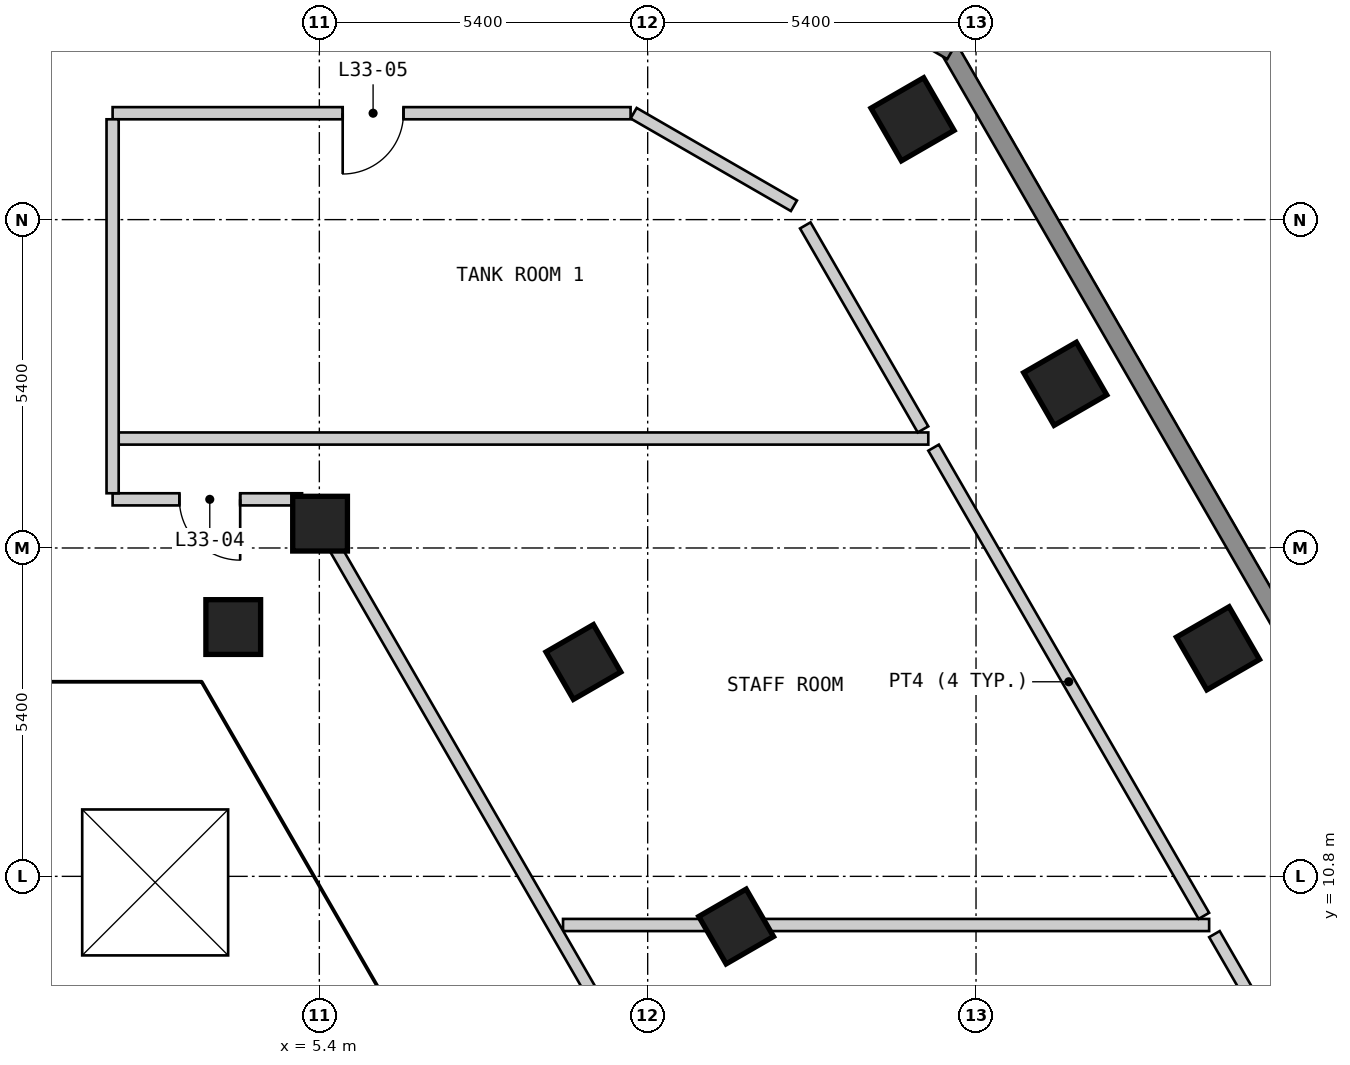
"""IFC4 building model, lengths in metres.
Left out: names, types, materials, properties, quantities, classifications, styles, units other than length and angle.
Written with IfcOpenShell. Run it as: python <this file> out.ifc"""

import sys

from ifc_helpers import new_model, si_unit, direction, frame, frame_2d, origin, origin_2d, place, context, subcontext, project, spatial, polyline, rectangle, outline, extrude, element, fill, save


model = new_model("IFC4")
c1 = context("Model", 3, precision=1e-05, world=origin(), true_north=direction((0.0, 1.0)))
c2 = subcontext(c1, "Body", "Model", "MODEL_VIEW")
j1 = project(units=[si_unit("LENGTHUNIT", "METRE"), si_unit("PLANEANGLEUNIT", "RADIAN")], contexts=[c1])
p1 = place(None, origin())
s1 = spatial("IfcSite", under=j1, at=p1, CompositionType="ELEMENT")
p2 = place(p1, origin())
s2 = spatial("IfcBuilding", under=s1, at=p2, CompositionType="ELEMENT")
p3 = place(p2, frame((0.0, 0.0, 108.0)))
s3 = spatial("IfcBuildingStorey", under=s2, at=p3, CompositionType="ELEMENT", Elevation=108.0)
p4 = place(p3, frame((20.179, 14.55, 0.0), z_axis=(0.0, 0.0, 1.0), x_axis=(-0.5, 0.866025403784, 0.0)))
e1 = element("IfcColumn", 1, at=p4, inside=s3, PredefinedType="COLUMN", context=c2, shape_type="SweptSolid", body=[
    extrude(rectangle(XDim=1.0, YDim=1.0, at=origin_2d()), origin(), (0.0, 0.0, 1.0), 2.6),
])
for number, where, z_axis, x_axis in (
    (2, (17.667, 18.9, 0.0), (0.0, 0.0, 1.0), (-0.5, 0.866, 0.0)),
    (3, (15.156, 23.25, 0.0), (0.0, 0.0, 1.0), (-0.5, 0.866, 0.0)),
):
    element("IfcColumn", number, at=place(p3, frame(where, z_axis=z_axis, x_axis=x_axis)), inside=s3, PredefinedType="COLUMN", context=c2, shape_type="SweptSolid", body=[
        extrude(rectangle(XDim=1.0, YDim=1.0, at=origin_2d()), origin(), (0.0, 0.0, 1.0), 3.6),
    ])
p5 = place(p3, frame((12.255, 9.975, 0.0), z_axis=(0.0, 0.0, 1.0), x_axis=(-0.5, 0.866025403784, 0.0)))
e4 = element("IfcColumn", 4, at=p5, inside=s3, PredefinedType="COLUMN", context=c2, shape_type="SweptSolid", body=[
    extrude(rectangle(XDim=0.9, YDim=0.9, at=origin_2d()), origin(), (0.0, 0.0, 1.0), 2.6),
])
for number, where, z_axis, x_axis in (
    (5, (9.743, 14.325, 0.0), (0.0, 0.0, 1.0), (-0.5, 0.866, 0.0)),
    (6, (5.412, 16.6, 0.0), (0.0, 0.0, 1.0), (-1.0, 0.0, 0.0)),
    (7, (3.984, 14.9, 0.0), (0.0, 0.0, 1.0), (1.0, 0.0, 0.0)),
):
    element("IfcColumn", number, at=place(p3, frame(where, z_axis=z_axis, x_axis=x_axis)), inside=s3, PredefinedType="COLUMN", context=c2, shape_type="SweptSolid", body=[
        extrude(rectangle(XDim=0.9, YDim=0.9, at=origin_2d()), origin(), (0.0, 0.0, 1.0), 3.6),
    ])
p6 = place(p3, frame((29.027, 1.425, 0.0), z_axis=(0.0, 0.0, 1.0), x_axis=(-0.500027479704, 0.866009537788, 0.0)))
e8 = element("IfcWall", 8, at=p6, inside=s3, PredefinedType="SOLIDWALL", context=c2, shape_type="SweptSolid", body=[
    extrude(outline(polyline([(0.0, -0.15), (26.559, -0.15), (26.478, 0.15), (0.08, 0.15), (0.0, -0.15)])), origin(), (0.0, 0.0, 1.0), 2.6),
])
p7 = place(p3, frame((15.802, 24.37, 0.0), z_axis=(0.0, 0.0, 1.0), x_axis=(-0.866022959057, 0.500004234368, 0.0)))
e9 = element("IfcWall", 9, at=p7, inside=s3, PredefinedType="SOLIDWALL", context=c2, shape_type="SweptSolid", body=[
    extrude(outline(polyline([(0.0, -0.15), (5.0, -0.15), (4.92, 0.15), (0.08, 0.15), (0.0, -0.15)])), origin(), (0.0, 0.0, 1.0), 2.6),
])
p8 = place(p3, frame((9.408, 10.0, 0.0), z_axis=(0.0, 0.0, 1.0), x_axis=(1.0, 0.0, 0.0)))
e10 = element("IfcWall", 10, at=p8, inside=s3, PredefinedType="SOLIDWALL", context=c2, shape_type="SweptSolid", body=[
    extrude(rectangle(XDim=10.626, YDim=0.2, at=frame_2d((5.313, 0.0))), origin(), (0.0, 0.0, 1.0), 2.6),
])
p9 = place(p3, frame((2.0, 17.0, 0.0), z_axis=(0.0, 0.0, 1.0), x_axis=(1.0, 0.0, 0.0)))
e11 = element("IfcWall", 11, at=p9, inside=s3, PredefinedType="PARTITIONING", context=c2, shape_type="SweptSolid", body=[
    extrude(rectangle(XDim=3.116, YDim=0.2, at=frame_2d((1.558, 0.0))), origin(), (0.0, 0.0, 1.0), 2.6),
])
p10 = place(p9, frame((1.098, 0.0, 0.0)))
e12 = element("IfcOpeningElement", 12, at=p10, cuts=e11, PredefinedType="OPENING", context=c2, shape_type="SweptSolid", body=[
    extrude(rectangle(XDim=1.0, YDim=2.1, at=frame_2d((0.5, 1.05))), frame((0.0, 0.11, 0.0), z_axis=(0.0, -1.0, 0.0), x_axis=(1.0, 0.0, 0.0)), (0.0, 0.0, 1.0), 0.22),
])
p11 = place(p3, frame((2.1, 18.0, 0.0), z_axis=(0.0, 0.0, 1.0), x_axis=(1.0, 0.0, 0.0)))
e13 = element("IfcWall", 13, at=p11, inside=s3, PredefinedType="SOLIDWALL", context=c2, shape_type="SweptSolid", body=[
    extrude(rectangle(XDim=13.315, YDim=0.2, at=frame_2d((6.657, 0.0))), origin(), (0.0, 0.0, 1.0), 2.6),
])
p12 = place(p3, frame((2.0, 23.35, 0.0), z_axis=(0.0, 0.0, 1.0), x_axis=(1.0, 0.0, 0.0)))
e14 = element("IfcWall", 14, at=p12, inside=s3, PredefinedType="SOLIDWALL", context=c2, shape_type="SweptSolid", body=[
    extrude(rectangle(XDim=8.519, YDim=0.2, at=frame_2d((4.26, 0.0))), origin(), (0.0, 0.0, 1.0), 2.6),
])
p13 = place(p12, frame((4.784, 0.0, 0.0), z_axis=(0.0, 0.0, 1.0), x_axis=(-1.0, 0.0, 0.0)))
e15 = element("IfcOpeningElement", 15, at=p13, cuts=e14, PredefinedType="OPENING", context=c2, shape_type="SweptSolid", body=[
    extrude(rectangle(XDim=1.0, YDim=2.1, at=frame_2d((0.5, 1.05))), frame((0.0, 0.11, 0.0), z_axis=(0.0, -1.0, 0.0), x_axis=(1.0, 0.0, 0.0)), (0.0, 0.0, 1.0), 0.22),
])
p14 = place(p3, frame((2.0, 17.1, 0.0), z_axis=(0.0, 0.0, 1.0), x_axis=(0.0, 1.0, 0.0)))
e16 = element("IfcWall", 16, at=p14, inside=s3, PredefinedType="SOLIDWALL", context=c2, shape_type="SweptSolid", body=[
    extrude(rectangle(XDim=6.15, YDim=0.2, at=frame_2d((3.075, 0.0))), origin(), (0.0, 0.0, 1.0), 2.6),
])
p15 = place(p3, frame((10.569, 23.35, 0.0), z_axis=(0.0, 0.0, 1.0), x_axis=(0.865978544239, -0.500081154332, 0.0)))
e17 = element("IfcWall", 17, at=p15, inside=s3, PredefinedType="SOLIDWALL", context=c2, shape_type="SweptSolid", body=[
    extrude(rectangle(XDim=3.044, YDim=0.2, at=frame_2d((1.522, 0.0))), origin(), (0.0, 0.0, 1.0), 2.6),
])
p16 = place(p3, frame((5.196, 17.0, 0.0), z_axis=(0.0, 0.0, 1.0), x_axis=(0.500084554436, -0.865976580754, 0.0)))
e18 = element("IfcWall", 18, at=p16, inside=s3, PredefinedType="SOLIDWALL", context=c2, shape_type="SweptSolid", body=[
    extrude(rectangle(XDim=10.388, YDim=0.2, at=frame_2d((5.194, 0.0))), origin(), (0.0, 0.0, 1.0), 2.6),
])
p17 = place(p3, frame((13.392, 21.505, 0.0), z_axis=(0.0, 0.0, 1.0), x_axis=(0.49976610526, -0.866160400869, 0.0)))
e19 = element("IfcWall", 19, at=p17, inside=s3, PredefinedType="SOLIDWALL", context=c2, shape_type="SweptSolid", body=[
    extrude(rectangle(XDim=3.873, YDim=0.2, at=frame_2d((1.937, 0.0))), origin(), (0.0, 0.0, 1.0), 2.6),
])
p18 = place(p3, frame((15.502, 17.85, 0.0), z_axis=(0.0, 0.0, 1.0), x_axis=(0.499945887847, -0.866056643197, 0.0)))
e20 = element("IfcWall", 20, at=p18, inside=s3, PredefinedType="PARTITIONING", context=c2, shape_type="SweptSolid", body=[
    extrude(rectangle(XDim=8.891, YDim=0.2, at=frame_2d((4.446, 0.0))), origin(), (0.0, 0.0, 1.0), 2.6),
])
p19 = place(p3, frame((20.121, 9.85, 0.0), z_axis=(0.0, 0.0, 1.0), x_axis=(0.500015313995, -0.866016562065, 0.0)))
e21 = element("IfcWall", 21, at=p19, inside=s3, PredefinedType="SOLIDWALL", context=c2, shape_type="SweptSolid", body=[
    extrude(rectangle(XDim=10.391, YDim=0.2, at=frame_2d((5.196, 0.0))), origin(), (0.0, 0.0, 1.0), 2.6),
])
p20 = place(p3, frame((0.0, 0.0, -0.4)))
p21 = place(p20, frame((2.7, 10.7, 0.0)))
p22 = place(p21, frame((0.0, 0.0, 0.35)))
e22 = element("IfcWindow", 22, at=p22, inside=s3, PartitioningType="SINGLE_PANEL", PredefinedType="SKYLIGHT", context=c2, shape_type="SweptSolid", body=[
    extrude(rectangle(XDim=2.4, YDim=2.4, at=origin_2d()), origin(), (0.0, 0.0, 1.0), 0.05),
])
p23 = place(p10, origin())
e23 = element("IfcDoor", 23, at=p23, inside=s3, OperationType="SINGLE_SWING_RIGHT", PredefinedType="DOOR", context=c2, shape_type="SweptSolid", body=[
    extrude(rectangle(XDim=1.0, YDim=2.1, at=frame_2d((0.5, 1.05))), frame((0.0, 0.025, 0.0), z_axis=(0.0, -1.0, 0.0), x_axis=(1.0, 0.0, 0.0)), (0.0, 0.0, 1.0), 0.05),
])
fill(e12, e23)
p24 = place(p13, origin())
e24 = element("IfcDoor", 24, at=p24, inside=s3, OperationType="SINGLE_SWING_RIGHT", PredefinedType="DOOR", context=c2, shape_type="SweptSolid", body=[
    extrude(rectangle(XDim=1.0, YDim=2.1, at=frame_2d((0.5, 1.05))), frame((0.0, 0.025, 0.0), z_axis=(0.0, -1.0, 0.0), x_axis=(1.0, 0.0, 0.0)), (0.0, 0.0, 1.0), 0.05),
])
fill(e15, e24)
save(model, sys.argv[1])
